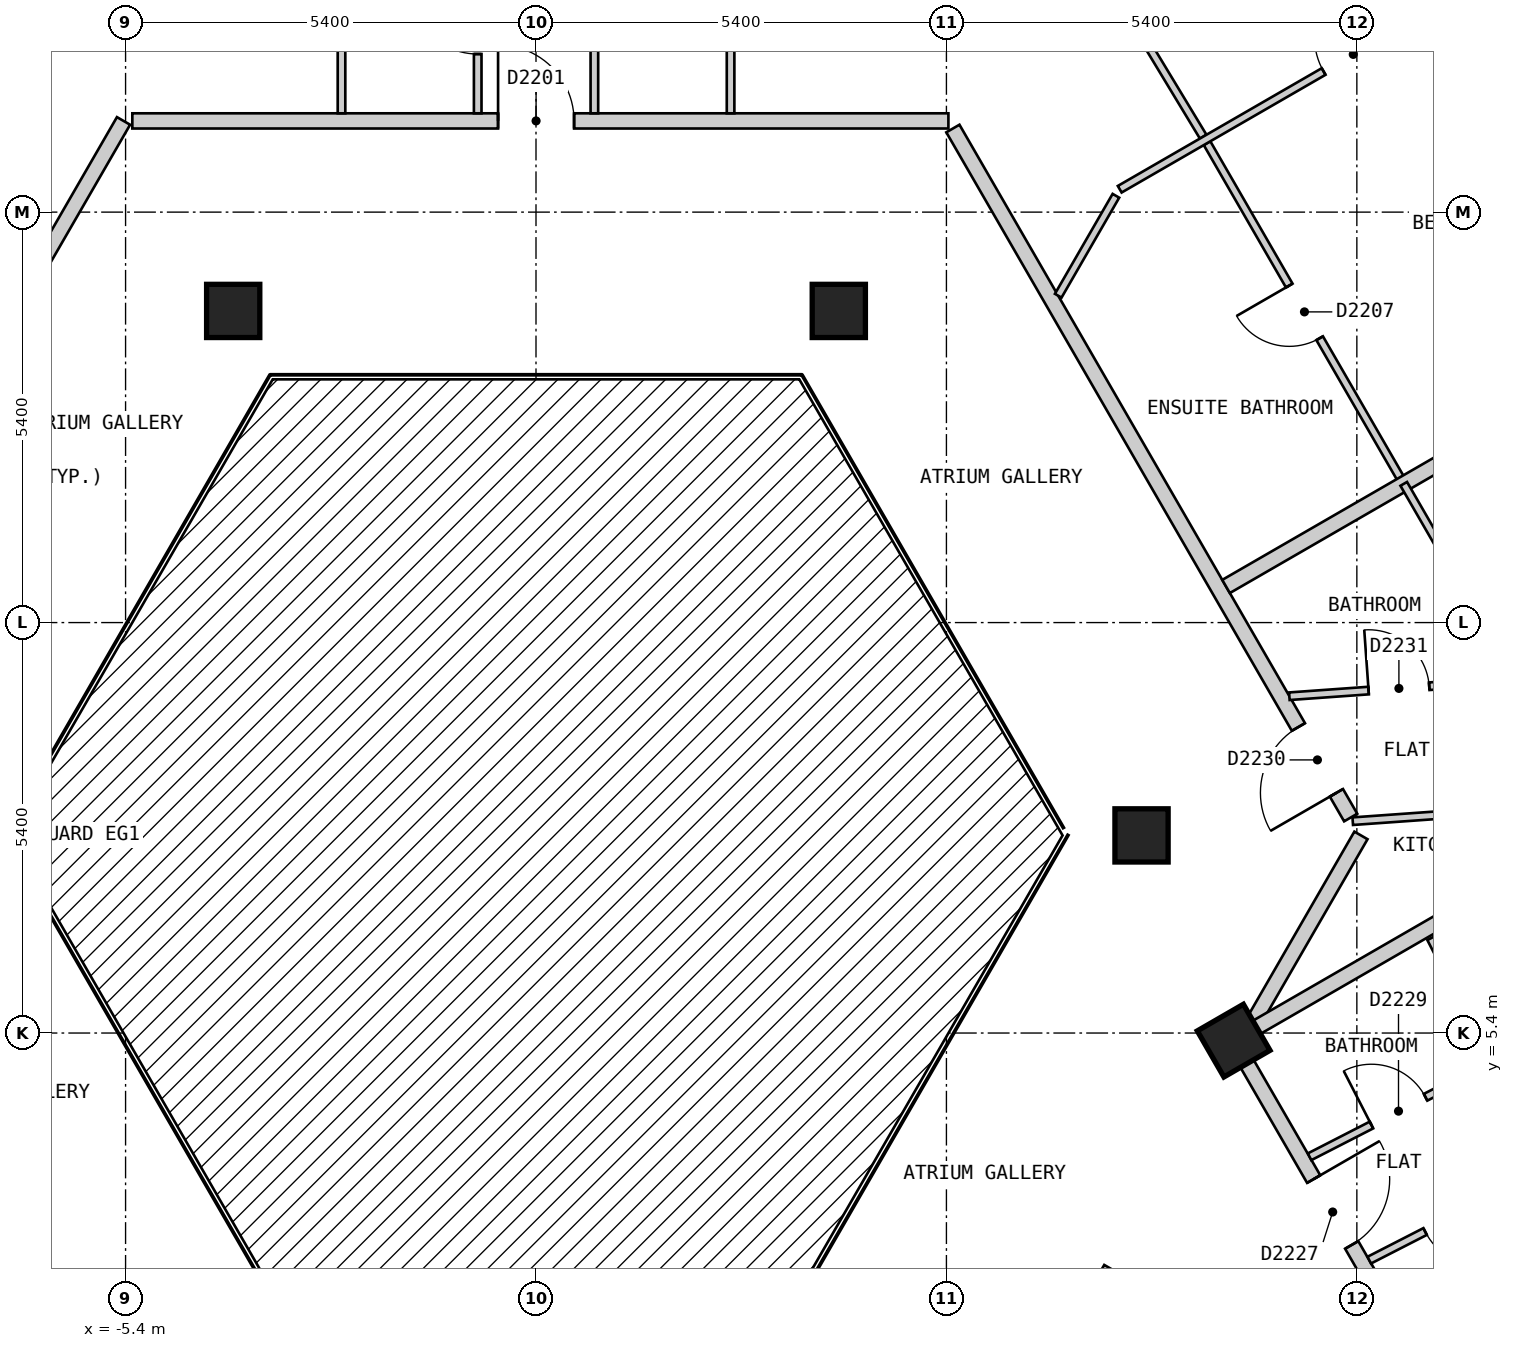
"""IFC4 building model, lengths in metres.
Left out: names, types, materials, properties, quantities, classifications, styles, units other than length and angle.
Written with IfcOpenShell. Run it as: python <this file> out.ifc"""

import sys

from ifc_helpers import new_model, si_unit, direction, frame, frame_2d, origin, origin_2d, place, context, subcontext, project, spatial, rectangle, extrude, element, fill, save


model = new_model("IFC4")
c1 = context("Model", 3, precision=1e-05, world=origin(), true_north=direction((0.0, 1.0)))
c2 = subcontext(c1, "Body", "Model", "MODEL_VIEW")
j1 = project(units=[si_unit("LENGTHUNIT", "METRE"), si_unit("PLANEANGLEUNIT", "RADIAN")], contexts=[c1])
p1 = place(None, origin())
s1 = spatial("IfcSite", under=j1, at=p1, CompositionType="ELEMENT")
p2 = place(p1, origin())
s2 = spatial("IfcBuilding", under=s1, at=p2, CompositionType="ELEMENT")
p3 = place(p2, frame((0.0, 0.0, 235.8)))
s3 = spatial("IfcBuildingStorey", under=s2, at=p3, CompositionType="ELEMENT", Elevation=235.8)
for number, where, z_axis, x_axis in (
    (1, (9.179, 5.3, 0.0), (0.0, 0.0, 1.0), (-0.5, 0.866, 0.0)),
    (2, (7.967, 8.0, 0.0), (0.0, 0.0, 1.0), (1.0, 0.0, 0.0)),
    (3, (3.984, 14.9, 0.0), (0.0, 0.0, 1.0), (1.0, 0.0, 0.0)),
    (4, (-3.984, 14.9, 0.0), (0.0, 0.0, 1.0), (1.0, 0.0, 0.0)),
):
    element("IfcColumn", number, at=place(p3, frame(where, z_axis=z_axis, x_axis=x_axis)), inside=s3, PredefinedType="COLUMN", context=c2, shape_type="SweptSolid", body=[
        extrude(rectangle(XDim=0.7, YDim=0.7, at=origin_2d()), origin(), (0.0, 0.0, 1.0), 3.0),
    ])
p4 = place(p3, frame((9.238, 5.2, 0.0), z_axis=(0.0, 0.0, 1.0), x_axis=(0.500025705601, -0.86601056214, 0.0)))
e5 = element("IfcWall", 5, at=p4, inside=s3, PredefinedType="PARTITIONING", context=c2, shape_type="SweptSolid", body=[
    extrude(rectangle(XDim=7.735, YDim=0.2, at=frame_2d((3.868, 0.0))), origin(), (0.0, 0.0, 1.0), 2.7),
])
p5 = place(p4, frame((6.898, 0.0, 0.0)))
e6 = element("IfcOpeningElement", 6, at=p5, cuts=e5, PredefinedType="OPENING", context=c2, shape_type="SweptSolid", body=[
    extrude(rectangle(XDim=0.8, YDim=2.1, at=frame_2d((0.4, 1.05))), frame((0.0, 0.11, 0.0), z_axis=(0.0, -1.0, 0.0), x_axis=(1.0, 0.0, 0.0)), (0.0, 0.0, 1.0), 0.22),
])
p6 = place(p4, frame((1.988, 0.0, 0.0)))
e7 = element("IfcOpeningElement", 7, at=p6, cuts=e5, PredefinedType="OPENING", context=c2, shape_type="SweptSolid", body=[
    extrude(rectangle(XDim=1.0, YDim=2.1, at=frame_2d((0.5, 1.05))), frame((0.0, 0.11, 0.0), z_axis=(0.0, -1.0, 0.0), x_axis=(1.0, 0.0, 0.0)), (0.0, 0.0, 1.0), 0.22),
])
p7 = place(p3, frame((5.485, 17.3, 0.0), z_axis=(0.0, 0.0, 1.0), x_axis=(0.500017221754, -0.866015460572, 0.0)))
e8 = element("IfcWall", 8, at=p7, inside=s3, PredefinedType="PARTITIONING", context=c2, shape_type="SweptSolid", body=[
    extrude(rectangle(XDim=10.468, YDim=0.2, at=frame_2d((5.234, 0.0))), origin(), (0.0, 0.0, 1.0), 2.7),
])
p8 = place(p7, frame((9.092, 0.0, 0.0)))
e9 = element("IfcOpeningElement", 9, at=p8, cuts=e8, PredefinedType="OPENING", context=c2, shape_type="SweptSolid", body=[
    extrude(rectangle(XDim=1.0, YDim=2.1, at=frame_2d((0.5, 1.05))), frame((0.0, 0.11, 0.0), z_axis=(0.0, -1.0, 0.0), x_axis=(1.0, 0.0, 0.0)), (0.0, 0.0, 1.0), 0.22),
])
p9 = place(p3, frame((-5.311, 17.4, 0.0), z_axis=(0.0, 0.0, 1.0), x_axis=(1.0, 0.0, 0.0)))
e10 = element("IfcWall", 10, at=p9, inside=s3, PredefinedType="PARTITIONING", context=c2, shape_type="SweptSolid", body=[
    extrude(rectangle(XDim=10.737, YDim=0.2, at=frame_2d((5.369, 0.0))), origin(), (0.0, 0.0, 1.0), 2.7),
])
p10 = place(p9, frame((4.812, 0.0, 0.0)))
e11 = element("IfcOpeningElement", 11, at=p10, cuts=e10, PredefinedType="OPENING", context=c2, shape_type="SweptSolid", body=[
    extrude(rectangle(XDim=1.0, YDim=2.1, at=frame_2d((0.5, 1.05))), frame((0.0, 0.11, 0.0), z_axis=(0.0, -1.0, 0.0), x_axis=(1.0, 0.0, 0.0)), (0.0, 0.0, 1.0), 0.22),
])
p11 = place(p3, frame((6.928, 1.2, 0.0), z_axis=(0.0, 0.0, 1.0), x_axis=(0.500255167297, 0.865878032746, 0.0)))
e12 = element("IfcWall", 12, at=p11, inside=s3, PredefinedType="PARTITIONING", context=c2, shape_type="SweptSolid", body=[
    extrude(rectangle(XDim=1.269, YDim=0.2, at=frame_2d((0.635, 0.0))), origin(), (0.0, 0.0, 1.0), 2.7),
])
p12 = place(p3, frame((9.354, 5.401, 0.0), z_axis=(0.0, 0.0, 1.0), x_axis=(0.499849222119, 0.866112437936, 0.0)))
e13 = element("IfcWall", 13, at=p12, inside=s3, PredefinedType="PARTITIONING", context=c2, shape_type="SweptSolid", body=[
    extrude(rectangle(XDim=3.001, YDim=0.2, at=frame_2d((1.5, 0.0))), origin(), (0.0, 0.0, 1.0), 2.7),
])
p13 = place(p3, frame((-10.854, 8.0, 0.0), z_axis=(0.0, 0.0, 1.0), x_axis=(0.499997637144, 0.866026767976, 0.0)))
e14 = element("IfcWall", 14, at=p13, inside=s3, PredefinedType="PARTITIONING", context=c2, shape_type="SweptSolid", body=[
    extrude(rectangle(XDim=10.854, YDim=0.2, at=frame_2d((5.427, 0.0))), origin(), (0.0, 0.0, 1.0), 2.7),
])
p14 = place(p3, frame((7.033, 20.077, 0.0), z_axis=(0.0, 0.0, 1.0), x_axis=(0.517730137343, -0.855543981854, 0.0)))
e15 = element("IfcWall", 15, at=p14, inside=s3, PredefinedType="PARTITIONING", context=c2, shape_type="SweptSolid", body=[
    extrude(rectangle(XDim=3.371, YDim=0.1, at=frame_2d((1.685, 0.0))), origin(), (0.0, 0.0, 1.0), 2.7),
])
p15 = place(p3, frame((8.829, 17.107, 0.0), z_axis=(0.0, 0.0, 1.0), x_axis=(0.500035512416, -0.866004899711, 0.0)))
e16 = element("IfcWall", 16, at=p15, inside=s3, PredefinedType="PARTITIONING", context=c2, shape_type="SweptSolid", body=[
    extrude(rectangle(XDim=5.175, YDim=0.1, at=frame_2d((2.588, 0.0))), origin(), (0.0, 0.0, 1.0), 2.7),
])
p16 = place(p15, frame((2.163, 0.0, 0.0)))
e17 = element("IfcOpeningElement", 17, at=p16, cuts=e16, PredefinedType="OPENING", context=c2, shape_type="SweptSolid", body=[
    extrude(rectangle(XDim=0.8, YDim=2.1, at=frame_2d((0.4, 1.05))), frame((0.0, 0.06, 0.0), z_axis=(0.0, -1.0, 0.0), x_axis=(1.0, 0.0, 0.0)), (0.0, 0.0, 1.0), 0.12),
])
p17 = place(p3, frame((11.772, 6.646, 0.0), z_axis=(0.0, 0.0, 1.0), x_axis=(0.456175983405, -0.889889584254, 0.0)))
e18 = element("IfcWall", 18, at=p17, inside=s3, PredefinedType="PARTITIONING", context=c2, shape_type="SweptSolid", body=[
    extrude(rectangle(XDim=3.348, YDim=0.1, at=frame_2d((1.674, 0.0))), origin(), (0.0, 0.0, 1.0), 2.7),
])
p18 = place(p3, frame((-2.559, 20.17, 0.0), z_axis=(0.0, 0.0, 1.0), x_axis=(0.0, -1.0, 0.0)))
e19 = element("IfcWall", 19, at=p18, inside=s3, PredefinedType="PARTITIONING", context=c2, shape_type="SweptSolid", body=[
    extrude(rectangle(XDim=2.67, YDim=0.1, at=frame_2d((1.335, 0.0))), origin(), (0.0, 0.0, 1.0), 2.7),
])
p19 = place(p3, frame((2.56, 20.03, 0.0), z_axis=(0.0, 0.0, 1.0), x_axis=(0.0, -1.0, 0.0)))
e20 = element("IfcWall", 20, at=p19, inside=s3, PredefinedType="PARTITIONING", context=c2, shape_type="SweptSolid", body=[
    extrude(rectangle(XDim=2.53, YDim=0.1, at=frame_2d((1.265, 0.0))), origin(), (0.0, 0.0, 1.0), 2.7),
])
p20 = place(p3, frame((6.871, 15.1, 0.0), z_axis=(0.0, 0.0, 1.0), x_axis=(0.499805980977, 0.866137391745, 0.0)))
e21 = element("IfcWall", 21, at=p20, inside=s3, PredefinedType="PARTITIONING", context=c2, shape_type="SweptSolid", body=[
    extrude(rectangle(XDim=1.518, YDim=0.1, at=frame_2d((0.759, 0.0))), origin(), (0.0, 0.0, 1.0), 2.7),
])
p21 = place(p3, frame((0.768, 17.5, 0.0), z_axis=(0.0, 0.0, 1.0), x_axis=(0.0, 1.0, 0.0)))
e22 = element("IfcWall", 22, at=p21, inside=s3, PredefinedType="PARTITIONING", context=c2, shape_type="SweptSolid", body=[
    extrude(rectangle(XDim=2.51, YDim=0.1, at=frame_2d((1.255, 0.0))), origin(), (0.0, 0.0, 1.0), 2.7),
])
p22 = place(p21, frame((0.83, 0.0, 0.0)))
e23 = element("IfcOpeningElement", 23, at=p22, cuts=e22, PredefinedType="OPENING", context=c2, shape_type="SweptSolid", body=[
    extrude(rectangle(XDim=0.8, YDim=2.1, at=frame_2d((0.4, 1.05))), frame((0.0, 0.06, 0.0), z_axis=(0.0, -1.0, 0.0), x_axis=(1.0, 0.0, 0.0)), (0.0, 0.0, 1.0), 0.12),
])
p23 = place(p3, frame((-0.767, 17.5, 0.0), z_axis=(0.0, 0.0, 1.0), x_axis=(0.0, 1.0, 0.0)))
e24 = element("IfcWall", 24, at=p23, inside=s3, PredefinedType="PARTITIONING", context=c2, shape_type="SweptSolid", body=[
    extrude(rectangle(XDim=2.559, YDim=0.1, at=frame_2d((1.28, 0.0))), origin(), (0.0, 0.0, 1.0), 2.7),
])
p24 = place(p23, frame((0.78, 0.0, 0.0)))
e25 = element("IfcOpeningElement", 25, at=p24, cuts=e24, PredefinedType="OPENING", context=c2, shape_type="SweptSolid", body=[
    extrude(rectangle(XDim=0.9, YDim=2.1, at=frame_2d((0.45, 1.05))), frame((0.0, 0.06, 0.0), z_axis=(0.0, -1.0, 0.0), x_axis=(1.0, 0.0, 0.0)), (0.0, 0.0, 1.0), 0.12),
])
p25 = place(p3, frame((10.178, 3.772, 0.0), z_axis=(0.0, 0.0, 1.0), x_axis=(0.889732071959, 0.456483121405, 0.0)))
e26 = element("IfcWall", 26, at=p25, inside=s3, PredefinedType="PARTITIONING", context=c2, shape_type="SweptSolid", body=[
    extrude(rectangle(XDim=2.679, YDim=0.1, at=frame_2d((1.34, 0.0))), origin(), (0.0, 0.0, 1.0), 2.7),
])
p26 = place(p25, frame((0.915, 0.0, 0.0)))
e27 = element("IfcOpeningElement", 27, at=p26, cuts=e26, PredefinedType="OPENING", context=c2, shape_type="SweptSolid", body=[
    extrude(rectangle(XDim=0.8, YDim=2.1, at=frame_2d((0.4, 1.05))), frame((0.0, 0.06, 0.0), z_axis=(0.0, -1.0, 0.0), x_axis=(1.0, 0.0, 0.0)), (0.0, 0.0, 1.0), 0.12),
])
p27 = place(p3, frame((10.963, 2.412, 0.0), z_axis=(0.0, 0.0, 1.0), x_axis=(0.889943997558, 0.456069820543, 0.0)))
e28 = element("IfcWall", 28, at=p27, inside=s3, PredefinedType="PARTITIONING", context=c2, shape_type="SweptSolid", body=[
    extrude(rectangle(XDim=2.651, YDim=0.1, at=frame_2d((1.325, 0.0))), origin(), (0.0, 0.0, 1.0), 2.7),
])
p28 = place(p27, frame((0.826, 0.0, 0.0)))
e29 = element("IfcOpeningElement", 29, at=p28, cuts=e28, PredefinedType="OPENING", context=c2, shape_type="SweptSolid", body=[
    extrude(rectangle(XDim=0.9, YDim=2.1, at=frame_2d((0.45, 1.05))), frame((0.0, 0.06, 0.0), z_axis=(0.0, -1.0, 0.0), x_axis=(1.0, 0.0, 0.0)), (0.0, 0.0, 1.0), 0.12),
])
p29 = place(p3, frame((7.68, 16.501, 0.0), z_axis=(0.0, 0.0, 1.0), x_axis=(0.86602149507, 0.500006770031, 0.0)))
e30 = element("IfcWall", 30, at=p29, inside=s3, PredefinedType="PARTITIONING", context=c2, shape_type="SweptSolid", body=[
    extrude(rectangle(XDim=5.798, YDim=0.1, at=frame_2d((2.899, 0.0))), origin(), (0.0, 0.0, 1.0), 2.7),
])
p30 = place(p29, frame((3.098, 0.0, 0.0)))
e31 = element("IfcOpeningElement", 31, at=p30, cuts=e30, PredefinedType="OPENING", context=c2, shape_type="SweptSolid", body=[
    extrude(rectangle(XDim=0.9, YDim=2.1, at=frame_2d((0.45, 1.05))), frame((0.0, 0.06, 0.0), z_axis=(0.0, -1.0, 0.0), x_axis=(1.0, 0.0, 0.0)), (0.0, 0.0, 1.0), 0.12),
])
p31 = place(p3, frame((10.746, 8.187, 0.0), z_axis=(0.0, 0.0, 1.0), x_axis=(0.997477310687, 0.070986017387, 0.0)))
e32 = element("IfcWall", 32, at=p31, inside=s3, PredefinedType="PARTITIONING", context=c2, shape_type="SweptSolid", body=[
    extrude(rectangle(XDim=3.058, YDim=0.1, at=frame_2d((1.529, 0.0))), origin(), (0.0, 0.0, 1.0), 2.7),
])
p32 = place(p31, frame((1.079, 0.0, 0.0)))
e33 = element("IfcOpeningElement", 33, at=p32, cuts=e32, PredefinedType="OPENING", context=c2, shape_type="SweptSolid", body=[
    extrude(rectangle(XDim=0.9, YDim=2.1, at=frame_2d((0.45, 1.05))), frame((0.0, 0.06, 0.0), z_axis=(0.0, -1.0, 0.0), x_axis=(1.0, 0.0, 0.0)), (0.0, 0.0, 1.0), 0.12),
])
p33 = place(p3, frame((9.912, 9.831, 0.0), z_axis=(0.0, 0.0, 1.0), x_axis=(0.997459937941, 0.071229714326, 0.0)))
e34 = element("IfcWall", 34, at=p33, inside=s3, PredefinedType="PARTITIONING", context=c2, shape_type="SweptSolid", body=[
    extrude(rectangle(XDim=3.002, YDim=0.1, at=frame_2d((1.501, 0.0))), origin(), (0.0, 0.0, 1.0), 2.7),
])
p34 = place(p33, frame((1.045, 0.0, 0.0)))
e35 = element("IfcOpeningElement", 35, at=p34, cuts=e34, PredefinedType="OPENING", context=c2, shape_type="SweptSolid", body=[
    extrude(rectangle(XDim=0.8, YDim=2.1, at=frame_2d((0.4, 1.05))), frame((0.0, 0.06, 0.0), z_axis=(0.0, -1.0, 0.0), x_axis=(1.0, 0.0, 0.0)), (0.0, 0.0, 1.0), 0.12),
])
p35 = place(p3, frame((9.457, 5.461, 0.0), z_axis=(0.0, 0.0, 1.0), x_axis=(0.866043818878, 0.499968102766, 0.0)))
e36 = element("IfcWall", 36, at=p35, inside=s3, PredefinedType="PARTITIONING", context=c2, shape_type="SweptSolid", body=[
    extrude(rectangle(XDim=9.779, YDim=0.2, at=frame_2d((4.89, 0.0))), origin(), (0.0, 0.0, 1.0), 2.7),
])
p36 = place(p3, frame((9.079, 11.275, 0.0), z_axis=(0.0, 0.0, 1.0), x_axis=(0.866001485781, 0.500041424909, 0.0)))
e37 = element("IfcWall", 37, at=p36, inside=s3, PredefinedType="PARTITIONING", context=c2, shape_type="SweptSolid", body=[
    extrude(rectangle(XDim=7.2, YDim=0.2, at=frame_2d((3.6, 0.0))), origin(), (0.0, 0.0, 1.0), 2.7),
])
p37 = place(p3, frame((11.417, 12.625, 0.0), z_axis=(0.0, 0.0, 1.0), x_axis=(0.500055103712, -0.865993587304, 0.0)))
e38 = element("IfcWall", 38, at=p37, inside=s3, PredefinedType="PARTITIONING", context=c2, shape_type="SweptSolid", body=[
    extrude(rectangle(XDim=2.944, YDim=0.1, at=frame_2d((1.472, 0.0))), origin(), (0.0, 0.0, 1.0), 2.7),
])
p38 = place(p10, origin())
e39 = element("IfcDoor", 39, at=p38, inside=s3, OperationType="SINGLE_SWING_LEFT", PredefinedType="DOOR", context=c2, shape_type="SweptSolid", body=[
    extrude(rectangle(XDim=1.0, YDim=2.1, at=frame_2d((0.5, 1.05))), frame((0.0, 0.025, 0.0), z_axis=(0.0, -1.0, 0.0), x_axis=(1.0, 0.0, 0.0)), (0.0, 0.0, 1.0), 0.05),
])
fill(e11, e39)
p39 = place(p24, origin())
e40 = element("IfcDoor", 40, at=p39, inside=s3, OperationType="SINGLE_SWING_RIGHT", PredefinedType="DOOR", context=c2, shape_type="SweptSolid", body=[
    extrude(rectangle(XDim=0.9, YDim=2.1, at=frame_2d((0.45, 1.05))), frame((0.0, 0.025, 0.0), z_axis=(0.0, -1.0, 0.0), x_axis=(1.0, 0.0, 0.0)), (0.0, 0.0, 1.0), 0.05),
])
fill(e25, e40)
p40 = place(p30, origin())
e41 = element("IfcDoor", 41, at=p40, inside=s3, OperationType="SINGLE_SWING_RIGHT", PredefinedType="DOOR", context=c2, shape_type="SweptSolid", body=[
    extrude(rectangle(XDim=0.9, YDim=2.1, at=frame_2d((0.45, 1.05))), frame((0.0, 0.025, 0.0), z_axis=(0.0, -1.0, 0.0), x_axis=(1.0, 0.0, 0.0)), (0.0, 0.0, 1.0), 0.05),
])
fill(e31, e41)
p41 = place(p16, origin())
e42 = element("IfcDoor", 42, at=p41, inside=s3, OperationType="SINGLE_SWING_LEFT", PredefinedType="DOOR", context=c2, shape_type="SweptSolid", body=[
    extrude(rectangle(XDim=0.8, YDim=2.1, at=frame_2d((0.4, 1.05))), frame((0.0, 0.025, 0.0), z_axis=(0.0, -1.0, 0.0), x_axis=(1.0, 0.0, 0.0)), (0.0, 0.0, 1.0), 0.05),
])
fill(e17, e42)
p42 = place(p6, origin())
e43 = element("IfcDoor", 43, at=p42, inside=s3, OperationType="SINGLE_SWING_LEFT", PredefinedType="DOOR", context=c2, shape_type="SweptSolid", body=[
    extrude(rectangle(XDim=1.0, YDim=2.1, at=frame_2d((0.5, 1.05))), frame((0.0, 0.025, 0.0), z_axis=(0.0, -1.0, 0.0), x_axis=(1.0, 0.0, 0.0)), (0.0, 0.0, 1.0), 0.05),
])
fill(e7, e43)
p43 = place(p28, origin())
e44 = element("IfcDoor", 44, at=p43, inside=s3, OperationType="SINGLE_SWING_RIGHT", PredefinedType="DOOR", context=c2, shape_type="SweptSolid", body=[
    extrude(rectangle(XDim=0.9, YDim=2.1, at=frame_2d((0.45, 1.05))), frame((0.0, 0.025, 0.0), z_axis=(0.0, -1.0, 0.0), x_axis=(1.0, 0.0, 0.0)), (0.0, 0.0, 1.0), 0.05),
])
fill(e29, e44)
p44 = place(p26, origin())
e45 = element("IfcDoor", 45, at=p44, inside=s3, OperationType="SINGLE_SWING_LEFT", PredefinedType="DOOR", context=c2, shape_type="SweptSolid", body=[
    extrude(rectangle(XDim=0.8, YDim=2.1, at=frame_2d((0.4, 1.05))), frame((0.0, 0.025, 0.0), z_axis=(0.0, -1.0, 0.0), x_axis=(1.0, 0.0, 0.0)), (0.0, 0.0, 1.0), 0.05),
])
fill(e27, e45)
p45 = place(p8, origin())
e46 = element("IfcDoor", 46, at=p45, inside=s3, OperationType="SINGLE_SWING_RIGHT", PredefinedType="DOOR", context=c2, shape_type="SweptSolid", body=[
    extrude(rectangle(XDim=1.0, YDim=2.1, at=frame_2d((0.5, 1.05))), frame((0.0, 0.025, 0.0), z_axis=(0.0, -1.0, 0.0), x_axis=(1.0, 0.0, 0.0)), (0.0, 0.0, 1.0), 0.05),
])
fill(e9, e46)
p46 = place(p34, origin())
e47 = element("IfcDoor", 47, at=p46, inside=s3, OperationType="SINGLE_SWING_LEFT", PredefinedType="DOOR", context=c2, shape_type="SweptSolid", body=[
    extrude(rectangle(XDim=0.8, YDim=2.1, at=frame_2d((0.4, 1.05))), frame((0.0, 0.025, 0.0), z_axis=(0.0, -1.0, 0.0), x_axis=(1.0, 0.0, 0.0)), (0.0, 0.0, 1.0), 0.05),
])
fill(e35, e47)
save(model, sys.argv[1])
